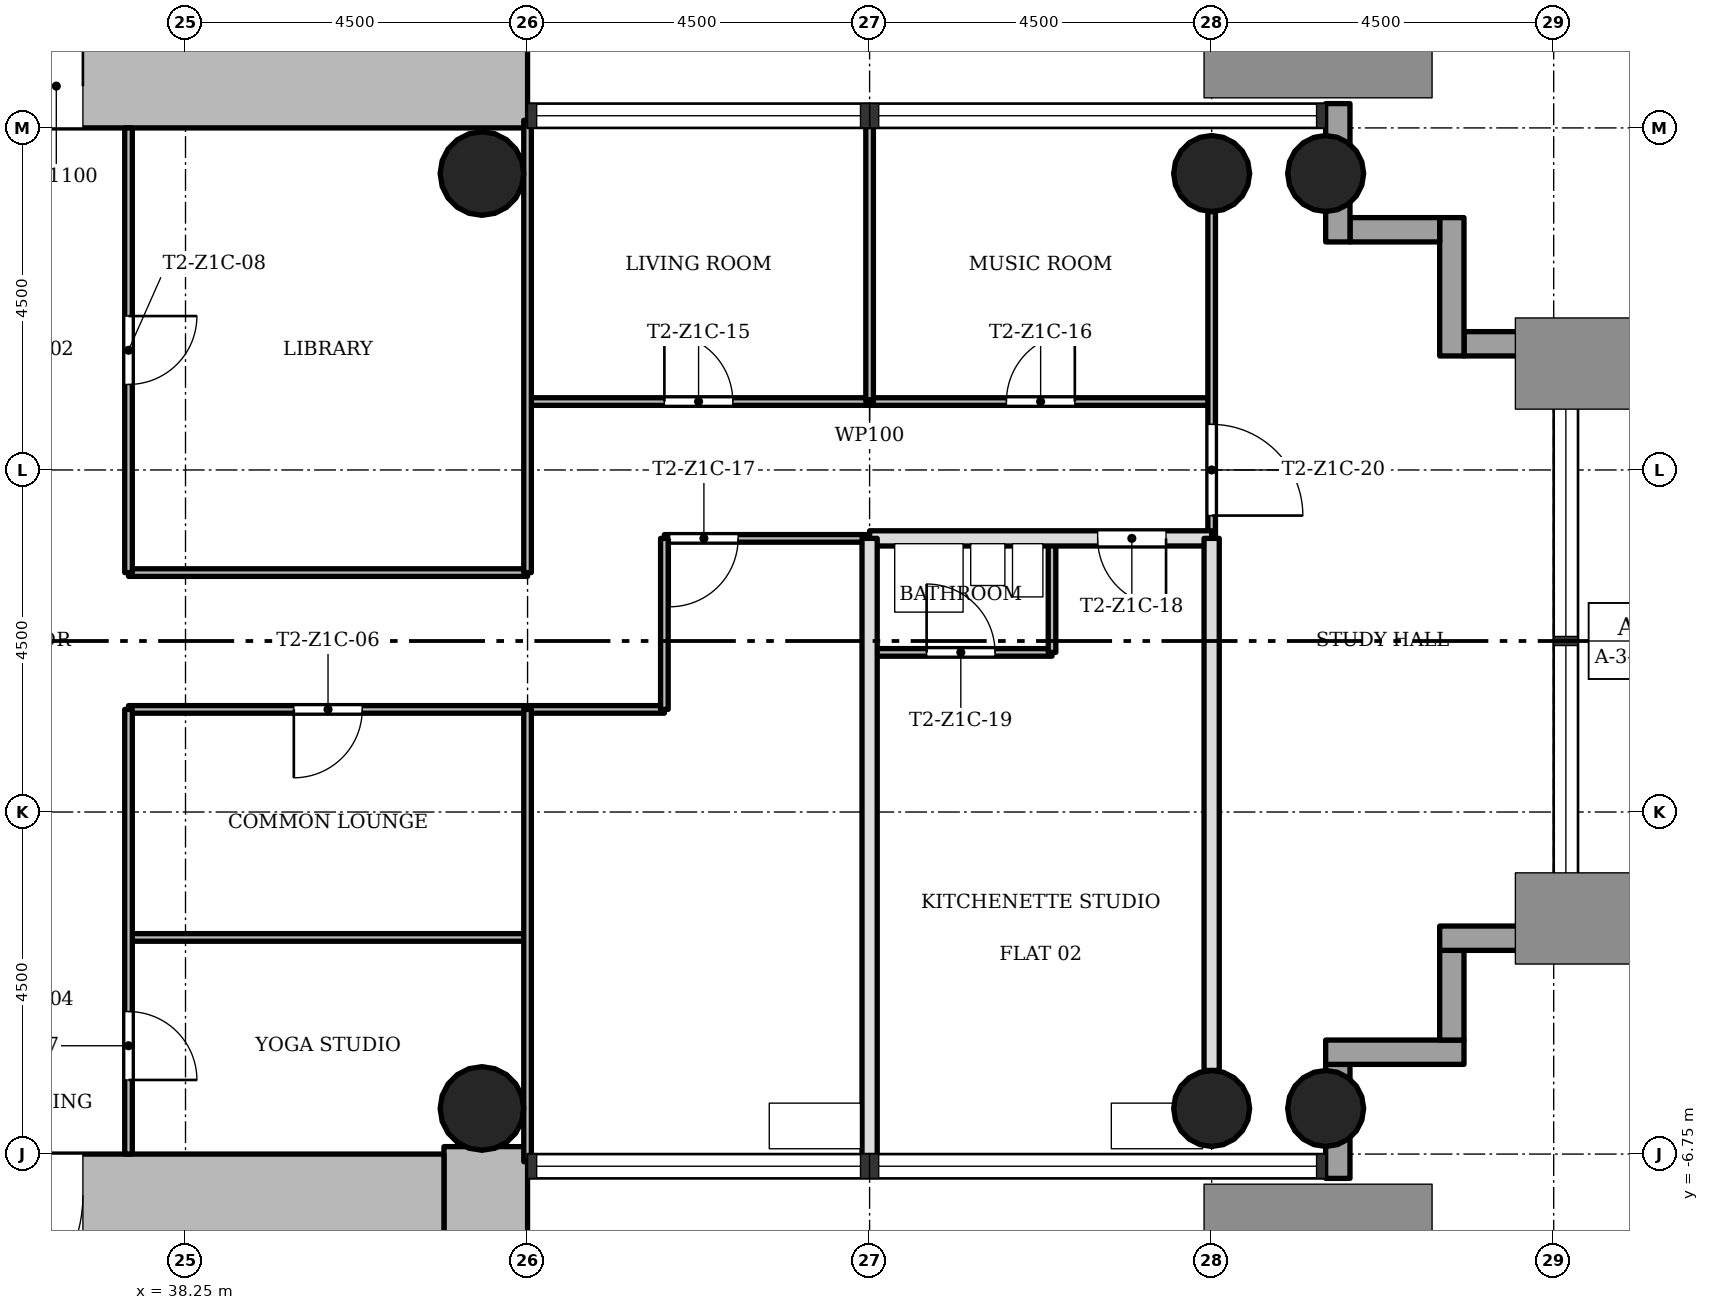
"""IFC4 building model, lengths in metres.
Left out: names, types, materials, properties, quantities, classifications, styles, units other than length and angle.
Written with IfcOpenShell. Run it as: python <this file> out.ifc"""

import sys

from ifc_helpers import new_model, si_unit, direction, frame, frame_2d, origin, origin_2d, place, context, subcontext, project, spatial, rectangle, hollow_circle, extrude, element, fill, save


model = new_model("IFC4")
c1 = context("Model", 3, precision=1e-05, world=origin(), true_north=direction((0.0, 1.0)))
c2 = subcontext(c1, "Body", "Model", "MODEL_VIEW")
j1 = project(units=[si_unit("LENGTHUNIT", "METRE"), si_unit("PLANEANGLEUNIT", "RADIAN")], contexts=[c1])
p1 = place(None, origin())
s1 = spatial("IfcSite", under=j1, at=p1, CompositionType="ELEMENT")
p2 = place(p1, origin())
s2 = spatial("IfcBuilding", under=s1, at=p2, CompositionType="ELEMENT")
p3 = place(p2, frame((0.0, 0.0, 51.7)))
s3 = spatial("IfcBuildingStorey", under=s2, at=p3, CompositionType="ELEMENT", Elevation=51.7)
p4 = place(p3, frame((30.35, 7.3, 0.0), z_axis=(0.0, 0.0, 1.0), x_axis=(1.0, 0.0, 0.0)))
e1 = element("IfcWall", 1, at=p4, inside=s3, PredefinedType="SHEAR", context=c2, shape_type="SweptSolid", body=[
    extrude(rectangle(XDim=12.4, YDim=1.1, at=frame_2d((6.2, 0.0))), origin(), (0.0, 0.0, 1.0), 3.4),
])
p5 = place(p4, frame((4.75, 0.0, 0.0)))
e2 = element("IfcOpeningElement", 2, at=p5, cuts=e1, PredefinedType="OPENING", context=c2, shape_type="SweptSolid", body=[
    extrude(rectangle(XDim=1.8, YDim=2.1, at=frame_2d((0.9, 1.05))), frame((0.0, 0.56, 0.0), z_axis=(0.0, -1.0, 0.0), x_axis=(1.0, 0.0, 0.0)), (0.0, 0.0, 1.0), 1.12),
])
p6 = place(p3, frame((42.2, -15.248, 0.0), z_axis=(0.0, 0.0, 1.0), x_axis=(0.0, 1.0, 0.0)))
e3 = element("IfcWall", 3, at=p6, inside=s3, PredefinedType="SHEAR", context=c2, shape_type="SweptSolid", body=[
    extrude(rectangle(XDim=8.596, YDim=1.1, at=frame_2d((4.298, 0.0))), origin(), (0.0, 0.0, 1.0), 3.4),
])
p7 = place(p3, frame((41.65, -7.3, 0.0), z_axis=(0.0, 0.0, 1.0), x_axis=(-1.0, 0.0, 0.0)))
e4 = element("IfcWall", 4, at=p7, inside=s3, PredefinedType="SHEAR", context=c2, shape_type="SweptSolid", body=[
    extrude(rectangle(XDim=12.4, YDim=1.1, at=frame_2d((6.2, 0.0))), origin(), (0.0, 0.0, 1.0), 3.4),
])
p8 = place(p7, frame((4.75, 0.0, 0.0)))
e5 = element("IfcOpeningElement", 5, at=p8, cuts=e4, PredefinedType="OPENING", context=c2, shape_type="SweptSolid", body=[
    extrude(rectangle(XDim=1.8, YDim=2.1, at=frame_2d((0.9, 1.05))), frame((0.0, 0.56, 0.0), z_axis=(0.0, -1.0, 0.0), x_axis=(1.0, 0.0, 0.0)), (0.0, 0.0, 1.0), 1.12),
])
for number, where, z_axis, x_axis in (
    (6, (51.75, -6.15, 0.0), (0.0, 0.0, 1.0), (1.0, 0.0, 0.0)),
    (7, (51.75, 6.15, 0.0), (0.0, 0.0, 1.0), (1.0, 0.0, 0.0)),
    (8, (53.25, -6.15, 0.0), (0.0, 0.0, 1.0), (1.0, 0.0, 0.0)),
    (9, (53.25, 6.15, 0.0), (0.0, 0.0, 1.0), (1.0, 0.0, 0.0)),
):
    element("IfcColumn", number, at=place(p3, frame(where, z_axis=z_axis, x_axis=x_axis)), inside=s3, PredefinedType="COLUMN", context=c2, shape_type="SweptSolid", body=[
        extrude(hollow_circle(Radius=0.5, WallThickness=0.036, at=origin_2d()), origin(), (0.0, 0.0, 1.0), 3.4),
    ])
for number, where, z_axis, x_axis in (
    (10, (42.15, -6.15, 0.0), (0.0, 0.0, 1.0), (1.0, 0.0, 0.0)),
    (11, (42.15, 6.15, 0.0), (0.0, 0.0, 1.0), (1.0, 0.0, 0.0)),
):
    element("IfcColumn", number, at=place(p3, frame(where, z_axis=z_axis, x_axis=x_axis)), inside=s3, PredefinedType="COLUMN", context=c2, shape_type="SweptSolid", body=[
        extrude(hollow_circle(Radius=0.55, WallThickness=0.04, at=origin_2d()), origin(), (0.0, 0.0, 1.0), 3.4),
    ])
p9 = place(p3, frame((53.41, -7.07, -0.3), z_axis=(0.0, 0.0, 1.0), x_axis=(0.0, 1.0, 0.0)))
e12 = element("IfcWall", 12, at=p9, inside=s3, PredefinedType="STANDARD", context=c2, shape_type="SweptSolid", body=[
    extrude(rectangle(XDim=1.5, YDim=0.32, at=frame_2d((0.75, 0.0))), origin(), (0.0, 0.0, 1.0), 3.4),
])
p10 = place(p3, frame((53.25, -5.41, -0.3), z_axis=(0.0, 0.0, 1.0), x_axis=(1.0, 0.0, 0.0)))
e13 = element("IfcWall", 13, at=p10, inside=s3, PredefinedType="STANDARD", context=c2, shape_type="SweptSolid", body=[
    extrude(rectangle(XDim=1.82, YDim=0.32, at=frame_2d((0.91, 0.0))), origin(), (0.0, 0.0, 1.0), 3.4),
])
p11 = place(p3, frame((54.91, -5.25, -0.3), z_axis=(0.0, 0.0, 1.0), x_axis=(0.0, 1.0, 0.0)))
e14 = element("IfcWall", 14, at=p11, inside=s3, PredefinedType="STANDARD", context=c2, shape_type="SweptSolid", body=[
    extrude(rectangle(XDim=1.18, YDim=0.32, at=frame_2d((0.59, 0.0))), origin(), (0.0, 0.0, 1.0), 3.4),
])
p12 = place(p3, frame((54.75, -3.91, -0.3), z_axis=(0.0, 0.0, 1.0), x_axis=(1.0, 0.0, 0.0)))
e15 = element("IfcWall", 15, at=p12, inside=s3, PredefinedType="STANDARD", context=c2, shape_type="SweptSolid", body=[
    extrude(rectangle(XDim=1.82, YDim=0.32, at=frame_2d((0.91, 0.0))), origin(), (0.0, 0.0, 1.0), 3.4),
])
p13 = place(p3, frame((56.57, 3.91, -0.3), z_axis=(0.0, 0.0, 1.0), x_axis=(-1.0, 0.0, 0.0)))
e16 = element("IfcWall", 16, at=p13, inside=s3, PredefinedType="STANDARD", context=c2, shape_type="SweptSolid", body=[
    extrude(rectangle(XDim=1.5, YDim=0.32, at=frame_2d((0.75, 0.0))), origin(), (0.0, 0.0, 1.0), 3.4),
])
p14 = place(p3, frame((54.91, 3.75, -0.3), z_axis=(0.0, 0.0, 1.0), x_axis=(0.0, 1.0, 0.0)))
e17 = element("IfcWall", 17, at=p14, inside=s3, PredefinedType="STANDARD", context=c2, shape_type="SweptSolid", body=[
    extrude(rectangle(XDim=1.82, YDim=0.32, at=frame_2d((0.91, 0.0))), origin(), (0.0, 0.0, 1.0), 3.4),
])
p15 = place(p3, frame((54.75, 5.41, -0.3), z_axis=(0.0, 0.0, 1.0), x_axis=(-1.0, 0.0, 0.0)))
e18 = element("IfcWall", 18, at=p15, inside=s3, PredefinedType="STANDARD", context=c2, shape_type="SweptSolid", body=[
    extrude(rectangle(XDim=1.18, YDim=0.32, at=frame_2d((0.59, 0.0))), origin(), (0.0, 0.0, 1.0), 3.4),
])
p16 = place(p3, frame((53.41, 5.25, -0.3), z_axis=(0.0, 0.0, 1.0), x_axis=(0.0, 1.0, 0.0)))
e19 = element("IfcWall", 19, at=p16, inside=s3, PredefinedType="STANDARD", context=c2, shape_type="SweptSolid", body=[
    extrude(rectangle(XDim=1.82, YDim=0.32, at=frame_2d((0.91, 0.0))), origin(), (0.0, 0.0, 1.0), 3.4),
])
p17 = place(p3, frame((42.75, -3.9, 0.0), z_axis=(0.0, 0.0, 1.0), x_axis=(-1.0, 0.0, 0.0)))
e20 = element("IfcWall", 20, at=p17, inside=s3, PredefinedType="PARTITIONING", context=c2, shape_type="SweptSolid", body=[
    extrude(rectangle(XDim=5.25, YDim=0.1, at=frame_2d((2.625, 0.0))), origin(), (0.0, 0.0, 1.0), 3.0),
])
p18 = place(p3, frame((44.55, -0.9, 0.0), z_axis=(0.0, 0.0, 1.0), x_axis=(-1.0, 0.0, 0.0)))
e21 = element("IfcWall", 21, at=p18, inside=s3, PredefinedType="PARTITIONING", context=c2, shape_type="SweptSolid", body=[
    extrude(rectangle(XDim=7.05, YDim=0.1, at=frame_2d((3.525, 0.0))), origin(), (0.0, 0.0, 1.0), 3.0),
])
p19 = place(p18, frame((3.975, 0.0, 0.0)))
e22 = element("IfcOpeningElement", 22, at=p19, cuts=e21, PredefinedType="OPENING", context=c2, shape_type="SweptSolid", body=[
    extrude(rectangle(XDim=0.9, YDim=2.1, at=frame_2d((0.45, 1.05))), frame((0.0, 0.06, 0.0), z_axis=(0.0, -1.0, 0.0), x_axis=(1.0, 0.0, 0.0)), (0.0, 0.0, 1.0), 0.12),
])
p20 = place(p3, frame((49.65, -0.15, 0.0), z_axis=(0.0, 0.0, 1.0), x_axis=(-1.0, 0.0, 0.0)))
e23 = element("IfcWall", 23, at=p20, inside=s3, PredefinedType="PARTITIONING", context=c2, shape_type="SweptSolid", body=[
    extrude(rectangle(XDim=2.4, YDim=0.1, at=frame_2d((1.2, 0.0))), origin(), (0.0, 0.0, 1.0), 3.0),
])
p21 = place(p20, frame((0.75, 0.0, 0.0)))
e24 = element("IfcOpeningElement", 24, at=p21, cuts=e23, PredefinedType="OPENING", context=c2, shape_type="SweptSolid", body=[
    extrude(rectangle(XDim=0.9, YDim=2.1, at=frame_2d((0.45, 1.05))), frame((0.0, 0.06, 0.0), z_axis=(0.0, -1.0, 0.0), x_axis=(1.0, 0.0, 0.0)), (0.0, 0.0, 1.0), 0.12),
])
p22 = place(p3, frame((42.75, 0.9, 0.0), z_axis=(0.0, 0.0, 1.0), x_axis=(-1.0, 0.0, 0.0)))
e25 = element("IfcWall", 25, at=p22, inside=s3, PredefinedType="PARTITIONING", context=c2, shape_type="SweptSolid", body=[
    extrude(rectangle(XDim=5.25, YDim=0.1, at=frame_2d((2.625, 0.0))), origin(), (0.0, 0.0, 1.0), 3.0),
])
p23 = place(p3, frame((47.25, 1.35, 0.0), z_axis=(0.0, 0.0, 1.0), x_axis=(-1.0, 0.0, 0.0)))
e26 = element("IfcWall", 26, at=p23, inside=s3, PredefinedType="PARTITIONING", context=c2, shape_type="SweptSolid", body=[
    extrude(rectangle(XDim=2.7, YDim=0.1, at=frame_2d((1.35, 0.0))), origin(), (0.0, 0.0, 1.0), 3.0),
])
p24 = place(p23, frame((1.73, 0.0, 0.0)))
e27 = element("IfcOpeningElement", 27, at=p24, cuts=e26, PredefinedType="OPENING", context=c2, shape_type="SweptSolid", body=[
    extrude(rectangle(XDim=0.9, YDim=2.1, at=frame_2d((0.45, 1.05))), frame((0.0, 0.06, 0.0), z_axis=(0.0, -1.0, 0.0), x_axis=(1.0, 0.0, 0.0)), (0.0, 0.0, 1.0), 0.12),
])
p25 = place(p3, frame((51.75, 1.35, 0.0), z_axis=(0.0, 0.0, 1.0), x_axis=(-1.0, 0.0, 0.0)))
e28 = element("IfcWall", 28, at=p25, inside=s3, PredefinedType="SOLIDWALL", context=c2, shape_type="SweptSolid", body=[
    extrude(rectangle(XDim=4.5, YDim=0.2, at=frame_2d((2.25, 0.0))), origin(), (0.0, 0.0, 1.0), 3.0),
])
p26 = place(p25, frame((0.6, 0.0, 0.0)))
e29 = element("IfcOpeningElement", 29, at=p26, cuts=e28, PredefinedType="OPENING", context=c2, shape_type="SweptSolid", body=[
    extrude(rectangle(XDim=0.9, YDim=2.1, at=frame_2d((0.45, 1.05))), frame((0.0, 0.11, 0.0), z_axis=(0.0, -1.0, 0.0), x_axis=(1.0, 0.0, 0.0)), (0.0, 0.0, 1.0), 0.22),
])
p27 = place(p3, frame((51.75, 3.15, 0.0), z_axis=(0.0, 0.0, 1.0), x_axis=(-1.0, 0.0, 0.0)))
e30 = element("IfcWall", 30, at=p27, inside=s3, PredefinedType="PARTITIONING", context=c2, shape_type="SweptSolid", body=[
    extrude(rectangle(XDim=9.0, YDim=0.1, at=frame_2d((4.5, 0.0))), origin(), (0.0, 0.0, 1.0), 3.0),
])
p28 = place(p27, frame((6.3, 0.0, 0.0)))
e31 = element("IfcOpeningElement", 31, at=p28, cuts=e30, PredefinedType="OPENING", context=c2, shape_type="SweptSolid", body=[
    extrude(rectangle(XDim=0.9, YDim=2.1, at=frame_2d((0.45, 1.05))), frame((0.0, 0.06, 0.0), z_axis=(0.0, -1.0, 0.0), x_axis=(1.0, 0.0, 0.0)), (0.0, 0.0, 1.0), 0.12),
])
p29 = place(p27, frame((1.8, 0.0, 0.0)))
e32 = element("IfcOpeningElement", 32, at=p29, cuts=e30, PredefinedType="OPENING", context=c2, shape_type="SweptSolid", body=[
    extrude(rectangle(XDim=0.9, YDim=2.1, at=frame_2d((0.45, 1.05))), frame((0.0, 0.06, 0.0), z_axis=(0.0, -1.0, 0.0), x_axis=(1.0, 0.0, 0.0)), (0.0, 0.0, 1.0), 0.12),
])
p30 = place(p3, frame((51.75, 1.35, 0.0), z_axis=(0.0, 0.0, 1.0), x_axis=(0.0, 1.0, 0.0)))
e33 = element("IfcWall", 33, at=p30, inside=s3, PredefinedType="PARTITIONING", context=c2, shape_type="SweptSolid", body=[
    extrude(rectangle(XDim=4.3, YDim=0.1, at=frame_2d((2.15, 0.0))), origin(), (0.0, 0.0, 1.0), 3.0),
])
p31 = place(p30, frame((0.3, 0.0, 0.0)))
e34 = element("IfcOpeningElement", 34, at=p31, cuts=e33, PredefinedType="OPENING", context=c2, shape_type="SweptSolid", body=[
    extrude(rectangle(XDim=1.2, YDim=2.1, at=frame_2d((0.6, 1.05))), frame((0.0, 0.06, 0.0), z_axis=(0.0, -1.0, 0.0), x_axis=(1.0, 0.0, 0.0)), (0.0, 0.0, 1.0), 0.12),
])
p32 = place(p3, frame((51.75, -5.65, 0.0), z_axis=(0.0, 0.0, 1.0), x_axis=(0.0, 1.0, 0.0)))
e35 = element("IfcWall", 35, at=p32, inside=s3, PredefinedType="SOLIDWALL", context=c2, shape_type="SweptSolid", body=[
    extrude(rectangle(XDim=7.0, YDim=0.2, at=frame_2d((3.5, 0.0))), origin(), (0.0, 0.0, 1.0), 3.0),
])
p33 = place(p3, frame((49.65, -0.15, 0.0), z_axis=(0.0, 0.0, 1.0), x_axis=(0.0, 1.0, 0.0)))
e36 = element("IfcWall", 36, at=p33, inside=s3, PredefinedType="PARTITIONING", context=c2, shape_type="SweptSolid", body=[
    extrude(rectangle(XDim=1.5, YDim=0.1, at=frame_2d((0.75, 0.0))), origin(), (0.0, 0.0, 1.0), 3.0),
])
p34 = place(p3, frame((47.25, 3.15, 0.0), z_axis=(0.0, 0.0, 1.0), x_axis=(0.0, 1.0, 0.0)))
e37 = element("IfcWall", 37, at=p34, inside=s3, PredefinedType="PARTITIONING", context=c2, shape_type="SweptSolid", body=[
    extrude(rectangle(XDim=3.7, YDim=0.1, at=frame_2d((1.85, 0.0))), origin(), (0.0, 0.0, 1.0), 3.0),
])
p35 = place(p3, frame((47.25, -6.85, 0.0), z_axis=(0.0, 0.0, 1.0), x_axis=(0.0, 1.0, 0.0)))
e38 = element("IfcWall", 38, at=p35, inside=s3, PredefinedType="SOLIDWALL", context=c2, shape_type="SweptSolid", body=[
    extrude(rectangle(XDim=8.2, YDim=0.2, at=frame_2d((4.1, 0.0))), origin(), (0.0, 0.0, 1.0), 3.0),
])
p36 = place(p3, frame((44.55, -0.9, 0.0), z_axis=(0.0, 0.0, 1.0), x_axis=(0.0, 1.0, 0.0)))
e39 = element("IfcWall", 39, at=p36, inside=s3, PredefinedType="PARTITIONING", context=c2, shape_type="SweptSolid", body=[
    extrude(rectangle(XDim=2.25, YDim=0.1, at=frame_2d((1.125, 0.0))), origin(), (0.0, 0.0, 1.0), 3.0),
])
for number, where, z_axis, x_axis in (
    (40, (42.75, -6.85, 0.0), (0.0, 0.0, 1.0), (0.0, 1.0, 0.0)),
    (41, (42.75, 0.9, 0.0), (0.0, 0.0, 1.0), (0.0, 1.0, 0.0)),
):
    element("IfcWall", number, at=place(p3, frame(where, z_axis=z_axis, x_axis=x_axis)), inside=s3, PredefinedType="PARTITIONING", context=c2, shape_type="SweptSolid", body=[
        extrude(rectangle(XDim=5.95, YDim=0.1, at=frame_2d((2.975, 0.0))), origin(), (0.0, 0.0, 1.0), 3.0),
    ])
p37 = place(p3, frame((37.5, -6.75, 0.0), z_axis=(0.0, 0.0, 1.0), x_axis=(0.0, 1.0, 0.0)))
e42 = element("IfcWall", 42, at=p37, inside=s3, PredefinedType="PARTITIONING", context=c2, shape_type="SweptSolid", body=[
    extrude(rectangle(XDim=5.85, YDim=0.1, at=frame_2d((2.925, 0.0))), origin(), (0.0, 0.0, 1.0), 3.0),
])
p38 = place(p37, frame((0.975, 0.0, 0.0)))
e43 = element("IfcOpeningElement", 43, at=p38, cuts=e42, PredefinedType="OPENING", context=c2, shape_type="SweptSolid", body=[
    extrude(rectangle(XDim=0.9, YDim=2.1, at=frame_2d((0.45, 1.05))), frame((0.0, 0.06, 0.0), z_axis=(0.0, -1.0, 0.0), x_axis=(1.0, 0.0, 0.0)), (0.0, 0.0, 1.0), 0.12),
])
p39 = place(p3, frame((37.5, 0.9, 0.0), z_axis=(0.0, 0.0, 1.0), x_axis=(0.0, 1.0, 0.0)))
e44 = element("IfcWall", 44, at=p39, inside=s3, PredefinedType="PARTITIONING", context=c2, shape_type="SweptSolid", body=[
    extrude(rectangle(XDim=5.85, YDim=0.1, at=frame_2d((2.925, 0.0))), origin(), (0.0, 0.0, 1.0), 3.0),
])
p40 = place(p39, frame((2.475, 0.0, 0.0)))
e45 = element("IfcOpeningElement", 45, at=p40, cuts=e44, PredefinedType="OPENING", context=c2, shape_type="SweptSolid", body=[
    extrude(rectangle(XDim=0.9, YDim=2.1, at=frame_2d((0.45, 1.05))), frame((0.0, 0.06, 0.0), z_axis=(0.0, -1.0, 0.0), x_axis=(1.0, 0.0, 0.0)), (0.0, 0.0, 1.0), 0.12),
])
p41 = place(p19, origin())
e46 = element("IfcDoor", 46, at=p41, inside=s3, OperationType="SINGLE_SWING_LEFT", PredefinedType="DOOR", context=c2, shape_type="SweptSolid", body=[
    extrude(rectangle(XDim=0.9, YDim=2.1, at=frame_2d((0.45, 1.05))), frame((0.0, 0.025, 0.0), z_axis=(0.0, -1.0, 0.0), x_axis=(1.0, 0.0, 0.0)), (0.0, 0.0, 1.0), 0.05),
])
fill(e22, e46)
p42 = place(p38, origin())
e47 = element("IfcDoor", 47, at=p42, inside=s3, OperationType="SINGLE_SWING_LEFT", PredefinedType="DOOR", context=c2, shape_type="SweptSolid", body=[
    extrude(rectangle(XDim=0.9, YDim=2.1, at=frame_2d((0.45, 1.05))), frame((0.0, 0.025, 0.0), z_axis=(0.0, -1.0, 0.0), x_axis=(1.0, 0.0, 0.0)), (0.0, 0.0, 1.0), 0.05),
])
fill(e43, e47)
p43 = place(p40, origin())
e48 = element("IfcDoor", 48, at=p43, inside=s3, OperationType="SINGLE_SWING_RIGHT", PredefinedType="DOOR", context=c2, shape_type="SweptSolid", body=[
    extrude(rectangle(XDim=0.9, YDim=2.1, at=frame_2d((0.45, 1.05))), frame((0.0, 0.025, 0.0), z_axis=(0.0, -1.0, 0.0), x_axis=(1.0, 0.0, 0.0)), (0.0, 0.0, 1.0), 0.05),
])
fill(e45, e48)
p44 = place(p28, origin())
e49 = element("IfcDoor", 49, at=p44, inside=s3, OperationType="SINGLE_SWING_RIGHT", PredefinedType="DOOR", context=c2, shape_type="SweptSolid", body=[
    extrude(rectangle(XDim=0.9, YDim=2.1, at=frame_2d((0.45, 1.05))), frame((0.0, 0.025, 0.0), z_axis=(0.0, -1.0, 0.0), x_axis=(1.0, 0.0, 0.0)), (0.0, 0.0, 1.0), 0.05),
])
fill(e31, e49)
p45 = place(p29, origin())
e50 = element("IfcDoor", 50, at=p45, inside=s3, OperationType="SINGLE_SWING_LEFT", PredefinedType="DOOR", context=c2, shape_type="SweptSolid", body=[
    extrude(rectangle(XDim=0.9, YDim=2.1, at=frame_2d((0.45, 1.05))), frame((0.0, 0.025, 0.0), z_axis=(0.0, -1.0, 0.0), x_axis=(1.0, 0.0, 0.0)), (0.0, 0.0, 1.0), 0.05),
])
fill(e32, e50)
p46 = place(p24, origin())
e51 = element("IfcDoor", 51, at=p46, inside=s3, OperationType="SINGLE_SWING_LEFT", PredefinedType="DOOR", context=c2, shape_type="SweptSolid", body=[
    extrude(rectangle(XDim=0.9, YDim=2.1, at=frame_2d((0.45, 1.05))), frame((0.0, 0.025, 0.0), z_axis=(0.0, -1.0, 0.0), x_axis=(1.0, 0.0, 0.0)), (0.0, 0.0, 1.0), 0.05),
])
fill(e27, e51)
p47 = place(p26, origin())
e52 = element("IfcDoor", 52, at=p47, inside=s3, OperationType="SINGLE_SWING_RIGHT", PredefinedType="DOOR", context=c2, shape_type="SweptSolid", body=[
    extrude(rectangle(XDim=0.9, YDim=2.1, at=frame_2d((0.45, 1.05))), frame((0.0, 0.025, 0.0), z_axis=(0.0, -1.0, 0.0), x_axis=(1.0, 0.0, 0.0)), (0.0, 0.0, 1.0), 0.05),
])
fill(e29, e52)
p48 = place(p21, origin())
e53 = element("IfcDoor", 53, at=p48, inside=s3, OperationType="SINGLE_SWING_RIGHT", PredefinedType="DOOR", context=c2, shape_type="SweptSolid", body=[
    extrude(rectangle(XDim=0.9, YDim=2.1, at=frame_2d((0.45, 1.05))), frame((0.0, 0.025, 0.0), z_axis=(0.0, -1.0, 0.0), x_axis=(1.0, 0.0, 0.0)), (0.0, 0.0, 1.0), 0.05),
])
fill(e24, e53)
p49 = place(p31, origin())
e54 = element("IfcDoor", 54, at=p49, inside=s3, OperationType="SINGLE_SWING_LEFT", PredefinedType="DOOR", context=c2, shape_type="SweptSolid", body=[
    extrude(rectangle(XDim=1.2, YDim=2.1, at=frame_2d((0.6, 1.05))), frame((0.0, 0.025, 0.0), z_axis=(0.0, -1.0, 0.0), x_axis=(1.0, 0.0, 0.0)), (0.0, 0.0, 1.0), 0.05),
])
fill(e34, e54)
p50 = place(p5, origin())
e55 = element("IfcDoor", 55, at=p50, inside=s3, OperationType="SINGLE_SWING_LEFT", PredefinedType="DOOR", context=c2, shape_type="SweptSolid", body=[
    extrude(rectangle(XDim=1.8, YDim=2.1, at=frame_2d((0.9, 1.05))), frame((0.0, 0.025, 0.0), z_axis=(0.0, -1.0, 0.0), x_axis=(1.0, 0.0, 0.0)), (0.0, 0.0, 1.0), 0.05),
])
fill(e2, e55)
p51 = place(p8, origin())
e56 = element("IfcDoor", 56, at=p51, inside=s3, OperationType="SINGLE_SWING_LEFT", PredefinedType="DOOR", context=c2, shape_type="SweptSolid", body=[
    extrude(rectangle(XDim=1.8, YDim=2.1, at=frame_2d((0.9, 1.05))), frame((0.0, 0.025, 0.0), z_axis=(0.0, -1.0, 0.0), x_axis=(1.0, 0.0, 0.0)), (0.0, 0.0, 1.0), 0.05),
])
fill(e5, e56)
save(model, sys.argv[1])
